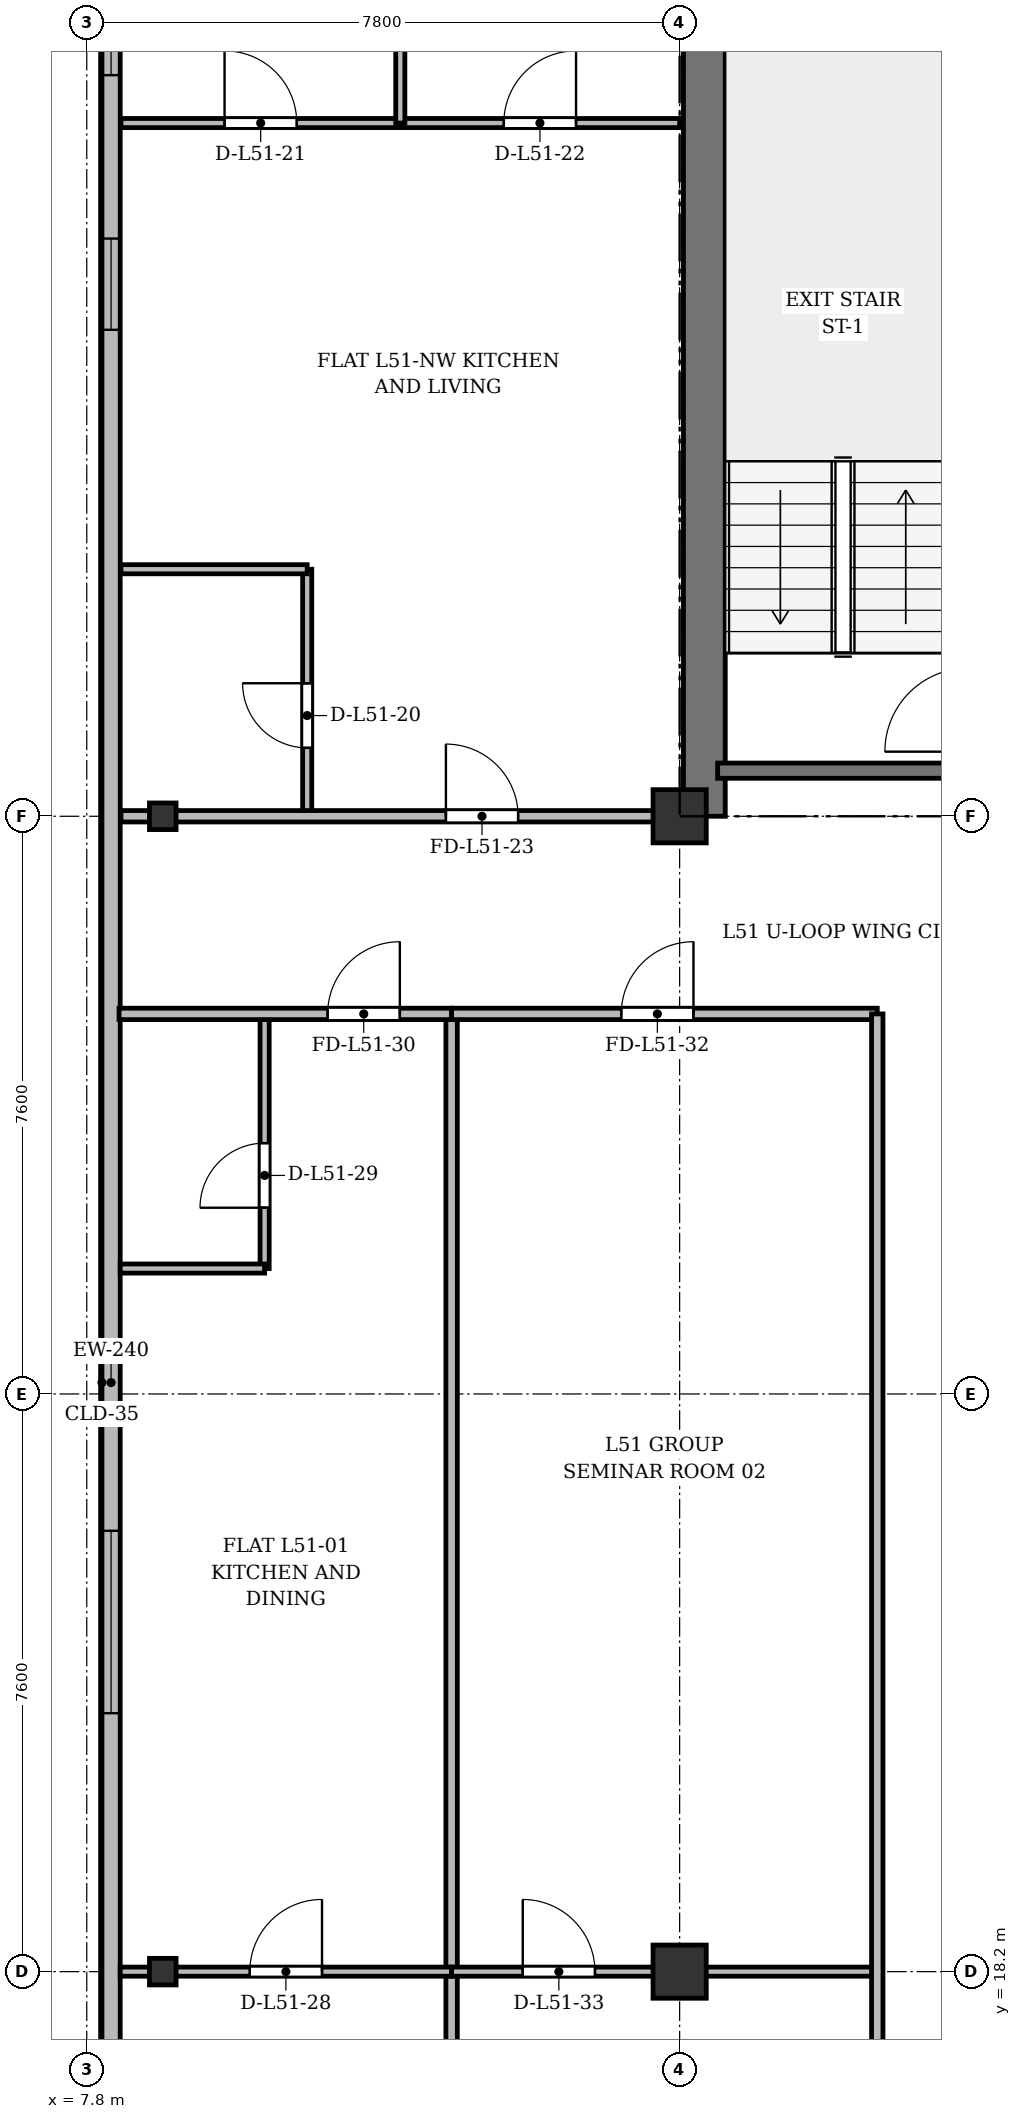
"""IFC4 building model, lengths in metres.
Left out: names, types, materials, properties, quantities, classifications, styles, units other than length and angle.
Written with IfcOpenShell. Run it as: python <this file> out.ifc"""

import sys

from ifc_helpers import new_model, si_unit, direction, frame, frame_2d, origin, origin_2d, place, context, subcontext, project, spatial, rectangle, i_section, extrude, source, transform, mapped, element, fill, save


model = new_model("IFC4")
c1 = context("Model", 3, precision=1e-05, world=origin(), true_north=direction((0.0, 1.0)))
c2 = subcontext(c1, "Body", "Model", "MODEL_VIEW")
j1 = project(units=[si_unit("LENGTHUNIT", "METRE"), si_unit("PLANEANGLEUNIT", "RADIAN")], contexts=[c1])
p1 = place(None, origin())
s1 = spatial("IfcSite", under=j1, at=p1, CompositionType="ELEMENT")
p2 = place(p1, origin())
s2 = spatial("IfcBuilding", under=s1, at=p2, CompositionType="ELEMENT")
p3 = place(p2, frame((0.0, 0.0, 197.7)))
s3 = spatial("IfcBuildingStorey", under=s2, at=p3, CompositionType="ELEMENT", Elevation=197.7)
m1 = source(origin(), c2, "Body", "SweptSolid", [
    extrude(i_section(OverallWidth=0.35, OverallDepth=0.35, WebThickness=0.018, FlangeThickness=0.028, at=origin_2d()), origin(), (0.0, 0.0, 1.0), 3.6),
])
for number, where, z_axis, x_axis in (
    (1, (8.8, 18.2, 0.0), (0.0, 0.0, 1.0), (1.0, 0.0, 0.0)),
    (2, (8.8, 33.4, 0.0), (0.0, 0.0, 1.0), (1.0, 0.0, 0.0)),
):
    element("IfcColumn", number, at=place(p3, frame(where, z_axis=z_axis, x_axis=x_axis)), inside=s3, PredefinedType="COLUMN", context=c2, shape_type="MappedRepresentation", body=[
        mapped(m1, transform((0.0, 0.0, 0.0), x_axis=(1.0, 0.0, 0.0), y_axis=(0.0, 1.0, 0.0), z_axis=(0.0, 0.0, 1.0), scale=1.0)),
    ])
m2 = source(origin(), c2, "Body", "SweptSolid", [
    extrude(rectangle(XDim=0.7, YDim=0.7, at=origin_2d()), origin(), (0.0, 0.0, 1.0), 3.6),
])
for number, where, z_axis, x_axis in (
    (3, (15.6, 18.2, 0.0), (0.0, 0.0, 1.0), (1.0, 0.0, 0.0)),
    (4, (15.6, 33.4, 0.0), (0.0, 0.0, 1.0), (1.0, 0.0, 0.0)),
):
    element("IfcColumn", number, at=place(p3, frame(where, z_axis=z_axis, x_axis=x_axis)), inside=s3, PredefinedType="COLUMN", context=c2, shape_type="MappedRepresentation", body=[
        mapped(m2, transform((0.0, 0.0, 0.0), x_axis=(1.0, 0.0, 0.0), y_axis=(0.0, 1.0, 0.0), z_axis=(0.0, 0.0, 1.0), scale=1.0)),
    ])
p4 = place(p3, frame((8.12, 6.4, 0.0), z_axis=(0.0, 0.0, 1.0), x_axis=(0.0, 1.0, 0.0)))
e5 = element("IfcWall", 5, at=p4, inside=s3, PredefinedType="SOLIDWALL", context=c2, shape_type="SweptSolid", body=[
    extrude(rectangle(XDim=39.1, YDim=0.24, at=frame_2d((19.55, 0.0))), origin(), (0.0, 0.0, 1.0), 3.36),
])
p5 = place(p4, frame((1.45, 0.0, 0.92)))
e6 = element("IfcOpeningElement", 6, at=p5, cuts=e5, PredefinedType="OPENING", context=c2, shape_type="SweptSolid", body=[
    extrude(rectangle(XDim=1.2, YDim=1.65, at=frame_2d((0.6, 0.825))), frame((0.0, 0.13, 0.0), z_axis=(0.0, -1.0, 0.0), x_axis=(1.0, 0.0, 0.0)), (0.0, 0.0, 1.0), 0.26),
])
p6 = place(p4, frame((3.8, 0.0, 0.92)))
e7 = element("IfcOpeningElement", 7, at=p6, cuts=e5, PredefinedType="OPENING", context=c2, shape_type="SweptSolid", body=[
    extrude(rectangle(XDim=2.4, YDim=2.1, at=frame_2d((1.2, 1.05))), frame((0.0, 0.13, 0.0), z_axis=(0.0, -1.0, 0.0), x_axis=(1.0, 0.0, 0.0)), (0.0, 0.0, 1.0), 0.26),
])
p7 = place(p4, frame((8.0, 0.0, 0.92)))
e8 = element("IfcOpeningElement", 8, at=p7, cuts=e5, PredefinedType="OPENING", context=c2, shape_type="SweptSolid", body=[
    extrude(rectangle(XDim=2.4, YDim=2.1, at=frame_2d((1.2, 1.05))), frame((0.0, 0.13, 0.0), z_axis=(0.0, -1.0, 0.0), x_axis=(1.0, 0.0, 0.0)), (0.0, 0.0, 1.0), 0.26),
])
p8 = place(p4, frame((15.2, 0.0, 0.92)))
e9 = element("IfcOpeningElement", 9, at=p8, cuts=e5, PredefinedType="OPENING", context=c2, shape_type="SweptSolid", body=[
    extrude(rectangle(XDim=2.4, YDim=2.1, at=frame_2d((1.2, 1.05))), frame((0.0, 0.13, 0.0), z_axis=(0.0, -1.0, 0.0), x_axis=(1.0, 0.0, 0.0)), (0.0, 0.0, 1.0), 0.26),
])
p9 = place(p4, frame((33.4, 0.0, 0.92)))
e10 = element("IfcOpeningElement", 10, at=p9, cuts=e5, PredefinedType="OPENING", context=c2, shape_type="SweptSolid", body=[
    extrude(rectangle(XDim=1.2, YDim=1.65, at=frame_2d((0.6, 0.825))), frame((0.0, 0.13, 0.0), z_axis=(0.0, -1.0, 0.0), x_axis=(1.0, 0.0, 0.0)), (0.0, 0.0, 1.0), 0.26),
])
p10 = place(p4, frame((36.75, 0.0, 0.92)))
e11 = element("IfcOpeningElement", 11, at=p10, cuts=e5, PredefinedType="OPENING", context=c2, shape_type="SweptSolid", body=[
    extrude(rectangle(XDim=1.2, YDim=1.65, at=frame_2d((0.6, 0.825))), frame((0.0, 0.13, 0.0), z_axis=(0.0, -1.0, 0.0), x_axis=(1.0, 0.0, 0.0)), (0.0, 0.0, 1.0), 0.26),
])
p11 = place(p3, frame((15.925, 33.4, 0.0), z_axis=(0.0, 0.0, 1.0), x_axis=(0.0, 1.0, 0.0)))
e12 = element("IfcWall", 12, at=p11, inside=s3, PredefinedType="SHEAR", context=c2, shape_type="SweptSolid", body=[
    extrude(rectangle(XDim=11.55, YDim=0.55, at=frame_2d((5.775, 0.0))), origin(), (0.0, 0.0, 1.0), 3.36),
])
p12 = place(p3, frame((16.1, 34.0, 0.0), z_axis=(0.0, 0.0, 1.0), x_axis=(1.0, 0.0, 0.0)))
e13 = element("IfcWall", 13, at=p12, inside=s3, PredefinedType="SHEAR", context=c2, shape_type="SweptSolid", body=[
    extrude(rectangle(XDim=3.4, YDim=0.2, at=frame_2d((1.7, 0.0))), origin(), (0.0, 0.0, 1.0), 3.36),
])
p13 = place(p3, frame((10.7, 33.4, 0.0), z_axis=(0.0, 0.0, 1.0), x_axis=(0.0, 1.0, 0.0)))
e14 = element("IfcWall", 14, at=p13, inside=s3, PredefinedType="PARTITIONING", context=c2, shape_type="SweptSolid", body=[
    extrude(rectangle(XDim=3.25, YDim=0.12, at=frame_2d((1.625, 0.0))), origin(), (0.0, 0.0, 1.0), 2.91),
])
p14 = place(p13, frame((0.9, 0.0, 0.0)))
e15 = element("IfcOpeningElement", 15, at=p14, cuts=e14, PredefinedType="OPENING", context=c2, shape_type="SweptSolid", body=[
    extrude(rectangle(XDim=0.85, YDim=2.1, at=frame_2d((0.425, 1.05))), frame((0.0, 0.07, 0.0), z_axis=(0.0, -1.0, 0.0), x_axis=(1.0, 0.0, 0.0)), (0.0, 0.0, 1.0), 0.14),
])
p15 = place(p3, frame((8.25, 36.65, 0.0), z_axis=(0.0, 0.0, 1.0), x_axis=(1.0, 0.0, 0.0)))
e16 = element("IfcWall", 16, at=p15, inside=s3, PredefinedType="PARTITIONING", context=c2, shape_type="SweptSolid", body=[
    extrude(rectangle(XDim=2.45, YDim=0.12, at=frame_2d((1.225, 0.0))), origin(), (0.0, 0.0, 1.0), 2.86),
])
p16 = place(p3, frame((8.25, 42.52, 0.0), z_axis=(0.0, 0.0, 1.0), x_axis=(1.0, 0.0, 0.0)))
e17 = element("IfcWall", 17, at=p16, inside=s3, PredefinedType="PARTITIONING", context=c2, shape_type="SweptSolid", body=[
    extrude(rectangle(XDim=3.675, YDim=0.12, at=frame_2d((1.837, 0.0))), origin(), (0.0, 0.0, 1.0), 2.86),
])
p17 = place(p16, frame((1.363, 0.0, 0.0)))
e18 = element("IfcOpeningElement", 18, at=p17, cuts=e17, PredefinedType="OPENING", context=c2, shape_type="SweptSolid", body=[
    extrude(rectangle(XDim=0.95, YDim=2.15, at=frame_2d((0.475, 1.075))), frame((0.0, 0.07, 0.0), z_axis=(0.0, -1.0, 0.0), x_axis=(1.0, 0.0, 0.0)), (0.0, 0.0, 1.0), 0.14),
])
p18 = place(p3, frame((11.925, 42.52, 0.0), z_axis=(0.0, 0.0, 1.0), x_axis=(1.0, 0.0, 0.0)))
e19 = element("IfcWall", 19, at=p18, inside=s3, PredefinedType="PARTITIONING", context=c2, shape_type="SweptSolid", body=[
    extrude(rectangle(XDim=3.675, YDim=0.12, at=frame_2d((1.837, 0.0))), origin(), (0.0, 0.0, 1.0), 2.86),
])
p19 = place(p18, frame((1.362, 0.0, 0.0)))
e20 = element("IfcOpeningElement", 20, at=p19, cuts=e19, PredefinedType="OPENING", context=c2, shape_type="SweptSolid", body=[
    extrude(rectangle(XDim=0.95, YDim=2.15, at=frame_2d((0.475, 1.075))), frame((0.0, 0.07, 0.0), z_axis=(0.0, -1.0, 0.0), x_axis=(1.0, 0.0, 0.0)), (0.0, 0.0, 1.0), 0.14),
])
p20 = place(p3, frame((11.925, 42.52, 0.0), z_axis=(0.0, 0.0, 1.0), x_axis=(0.0, 1.0, 0.0)))
e21 = element("IfcWall", 21, at=p20, inside=s3, PredefinedType="PARTITIONING", context=c2, shape_type="SweptSolid", body=[
    extrude(rectangle(XDim=5.74, YDim=0.12, at=frame_2d((2.87, 0.0))), origin(), (0.0, 0.0, 1.0), 2.91),
])
p21 = place(p3, frame((8.25, 33.4, 0.0), z_axis=(0.0, 0.0, 1.0), x_axis=(1.0, 0.0, 0.0)))
e22 = element("IfcWall", 22, at=p21, inside=s3, PredefinedType="PARTITIONING", context=c2, shape_type="SweptSolid", body=[
    extrude(rectangle(XDim=7.35, YDim=0.15, at=frame_2d((3.675, 0.0))), origin(), (0.0, 0.0, 1.0), 2.91),
])
p22 = place(p21, frame((4.275, 0.0, 0.0)))
e23 = element("IfcOpeningElement", 23, at=p22, cuts=e22, PredefinedType="OPENING", context=c2, shape_type="SweptSolid", body=[
    extrude(rectangle(XDim=0.95, YDim=2.15, at=frame_2d((0.475, 1.075))), frame((0.0, 0.085, 0.0), z_axis=(0.0, -1.0, 0.0), x_axis=(1.0, 0.0, 0.0)), (0.0, 0.0, 1.0), 0.17),
])
p23 = place(p3, frame((12.6, 3.625, 0.0), z_axis=(0.0, 0.0, 1.0), x_axis=(0.0, 1.0, 0.0)))
e24 = element("IfcWall", 24, at=p23, inside=s3, PredefinedType="PARTITIONING", context=c2, shape_type="SweptSolid", body=[
    extrude(rectangle(XDim=27.175, YDim=0.15, at=frame_2d((13.587, 0.0))), origin(), (0.0, 0.0, 1.0), 2.91),
])
p24 = place(p3, frame((8.24, 18.2, 0.0), z_axis=(0.0, 0.0, 1.0), x_axis=(1.0, 0.0, 0.0)))
e25 = element("IfcWall", 25, at=p24, inside=s3, PredefinedType="PARTITIONING", context=c2, shape_type="SweptSolid", body=[
    extrude(rectangle(XDim=4.36, YDim=0.12, at=frame_2d((2.18, 0.0))), origin(), (0.0, 0.0, 1.0), 2.91),
])
p25 = place(p24, frame((1.705, 0.0, 0.0)))
e26 = element("IfcOpeningElement", 26, at=p25, cuts=e25, PredefinedType="OPENING", context=c2, shape_type="SweptSolid", body=[
    extrude(rectangle(XDim=0.95, YDim=2.15, at=frame_2d((0.475, 1.075))), frame((0.0, 0.07, 0.0), z_axis=(0.0, -1.0, 0.0), x_axis=(1.0, 0.0, 0.0)), (0.0, 0.0, 1.0), 0.14),
])
p26 = place(p3, frame((10.14, 27.45, 0.0), z_axis=(0.0, 0.0, 1.0), x_axis=(0.0, 1.0, 0.0)))
e27 = element("IfcWall", 27, at=p26, inside=s3, PredefinedType="PARTITIONING", context=c2, shape_type="SweptSolid", body=[
    extrude(rectangle(XDim=3.35, YDim=0.12, at=frame_2d((1.675, 0.0))), origin(), (0.0, 0.0, 1.0), 3.36),
])
p27 = place(p26, frame((0.8, 0.0, 0.0)))
e28 = element("IfcOpeningElement", 28, at=p27, cuts=e27, PredefinedType="OPENING", context=c2, shape_type="SweptSolid", body=[
    extrude(rectangle(XDim=0.85, YDim=2.1, at=frame_2d((0.425, 1.05))), frame((0.0, 0.07, 0.0), z_axis=(0.0, -1.0, 0.0), x_axis=(1.0, 0.0, 0.0)), (0.0, 0.0, 1.0), 0.14),
])
p28 = place(p3, frame((8.24, 27.45, 0.0), z_axis=(0.0, 0.0, 1.0), x_axis=(1.0, 0.0, 0.0)))
e29 = element("IfcWall", 29, at=p28, inside=s3, PredefinedType="PARTITIONING", context=c2, shape_type="SweptSolid", body=[
    extrude(rectangle(XDim=1.9, YDim=0.12, at=frame_2d((0.95, 0.0))), origin(), (0.0, 0.0, 1.0), 2.86),
])
p29 = place(p3, frame((8.225, 30.8, 0.0), z_axis=(0.0, 0.0, 1.0), x_axis=(1.0, 0.0, 0.0)))
e30 = element("IfcWall", 30, at=p29, inside=s3, PredefinedType="PARTITIONING", context=c2, shape_type="SweptSolid", body=[
    extrude(rectangle(XDim=4.375, YDim=0.15, at=frame_2d((2.188, 0.0))), origin(), (0.0, 0.0, 1.0), 2.86),
])
p30 = place(p29, frame((2.744, 0.0, 0.0)))
e31 = element("IfcOpeningElement", 31, at=p30, cuts=e30, PredefinedType="OPENING", context=c2, shape_type="SweptSolid", body=[
    extrude(rectangle(XDim=0.95, YDim=2.15, at=frame_2d((0.475, 1.075))), frame((0.0, 0.085, 0.0), z_axis=(0.0, -1.0, 0.0), x_axis=(1.0, 0.0, 0.0)), (0.0, 0.0, 1.0), 0.17),
])
p31 = place(p3, frame((12.6, 30.8, 0.0), z_axis=(0.0, 0.0, 1.0), x_axis=(1.0, 0.0, 0.0)))
e32 = element("IfcWall", 32, at=p31, inside=s3, PredefinedType="PARTITIONING", context=c2, shape_type="SweptSolid", body=[
    extrude(rectangle(XDim=5.6, YDim=0.15, at=frame_2d((2.8, 0.0))), origin(), (0.0, 0.0, 1.0), 2.86),
])
p32 = place(p31, frame((2.232, 0.0, 0.0)))
e33 = element("IfcOpeningElement", 33, at=p32, cuts=e32, PredefinedType="OPENING", context=c2, shape_type="SweptSolid", body=[
    extrude(rectangle(XDim=0.95, YDim=2.15, at=frame_2d((0.475, 1.075))), frame((0.0, 0.085, 0.0), z_axis=(0.0, -1.0, 0.0), x_axis=(1.0, 0.0, 0.0)), (0.0, 0.0, 1.0), 0.17),
])
p33 = place(p3, frame((12.6, 18.2, 0.0), z_axis=(0.0, 0.0, 1.0), x_axis=(1.0, 0.0, 0.0)))
e34 = element("IfcWall", 34, at=p33, inside=s3, PredefinedType="PARTITIONING", context=c2, shape_type="SweptSolid", body=[
    extrude(rectangle(XDim=5.6, YDim=0.12, at=frame_2d((2.8, 0.0))), origin(), (0.0, 0.0, 1.0), 2.91),
])
p34 = place(p33, frame((0.936, 0.0, 0.0)))
e35 = element("IfcOpeningElement", 35, at=p34, cuts=e34, PredefinedType="OPENING", context=c2, shape_type="SweptSolid", body=[
    extrude(rectangle(XDim=0.95, YDim=2.15, at=frame_2d((0.475, 1.075))), frame((0.0, 0.07, 0.0), z_axis=(0.0, -1.0, 0.0), x_axis=(1.0, 0.0, 0.0)), (0.0, 0.0, 1.0), 0.14),
])
p35 = place(p3, frame((18.2, 3.625, 0.0), z_axis=(0.0, 0.0, 1.0), x_axis=(0.0, 1.0, 0.0)))
e36 = element("IfcWall", 36, at=p35, inside=s3, PredefinedType="PARTITIONING", context=c2, shape_type="SweptSolid", body=[
    extrude(rectangle(XDim=27.175, YDim=0.15, at=frame_2d((13.587, 0.0))), origin(), (0.0, 0.0, 1.0), 2.91),
])
m3 = source(origin(), c2, "Body", "SweptSolid", [
    extrude(rectangle(XDim=2.4, YDim=2.1, at=frame_2d((1.2, 1.05))), frame((0.0, 0.03, 0.0), z_axis=(0.0, -1.0, 0.0), x_axis=(1.0, 0.0, 0.0)), (0.0, 0.0, 1.0), 0.06),
])
p36 = place(p8, origin())
e37 = element("IfcWindow", 37, at=p36, inside=s3, PartitioningType="SINGLE_PANEL", PredefinedType="WINDOW", context=c2, shape_type="MappedRepresentation", body=[
    mapped(m3, transform((0.0, 0.0, 0.0), x_axis=(1.0, 0.0, 0.0), y_axis=(0.0, 1.0, 0.0), z_axis=(0.0, 0.0, 1.0), scale=1.0)),
])
fill(e9, e37)
m4 = source(origin(), c2, "Body", "SweptSolid", [
    extrude(rectangle(XDim=1.2, YDim=1.65, at=frame_2d((0.6, 0.825))), frame((0.0, 0.03, 0.0), z_axis=(0.0, -1.0, 0.0), x_axis=(1.0, 0.0, 0.0)), (0.0, 0.0, 1.0), 0.06),
])
p37 = place(p9, origin())
e38 = element("IfcWindow", 38, at=p37, inside=s3, PartitioningType="SINGLE_PANEL", PredefinedType="WINDOW", context=c2, shape_type="MappedRepresentation", body=[
    mapped(m4, transform((0.0, 0.0, 0.0), x_axis=(1.0, 0.0, 0.0), y_axis=(0.0, 1.0, 0.0), z_axis=(0.0, 0.0, 1.0), scale=1.0)),
])
fill(e10, e38)
p38 = place(p10, origin())
e39 = element("IfcWindow", 39, at=p38, inside=s3, PartitioningType="SINGLE_PANEL", PredefinedType="WINDOW", context=c2, shape_type="MappedRepresentation", body=[
    mapped(m4, transform((0.0, 0.0, 0.0), x_axis=(1.0, 0.0, 0.0), y_axis=(0.0, 1.0, 0.0), z_axis=(0.0, 0.0, 1.0), scale=1.0)),
])
fill(e11, e39)
m5 = source(origin(), c2, "Body", "SweptSolid", [
    extrude(rectangle(XDim=0.85, YDim=2.1, at=frame_2d((0.425, 1.05))), frame((0.0, 0.025, 0.0), z_axis=(0.0, -1.0, 0.0), x_axis=(1.0, 0.0, 0.0)), (0.0, 0.0, 1.0), 0.05),
])
p39 = place(p14, origin())
e40 = element("IfcDoor", 40, at=p39, inside=s3, OperationType="SINGLE_SWING_RIGHT", PredefinedType="DOOR", context=c2, shape_type="MappedRepresentation", body=[
    mapped(m5, transform((0.0, 0.0, 0.0), x_axis=(1.0, 0.0, 0.0), y_axis=(0.0, 1.0, 0.0), z_axis=(0.0, 0.0, 1.0), scale=1.0)),
])
fill(e15, e40)
m6 = source(origin(), c2, "Body", "SweptSolid", [
    extrude(rectangle(XDim=0.95, YDim=2.15, at=frame_2d((0.475, 1.075))), frame((0.0, 0.025, 0.0), z_axis=(0.0, -1.0, 0.0), x_axis=(1.0, 0.0, 0.0)), (0.0, 0.0, 1.0), 0.05),
])
p40 = place(p17, origin())
e41 = element("IfcDoor", 41, at=p40, inside=s3, OperationType="SINGLE_SWING_LEFT", PredefinedType="DOOR", context=c2, shape_type="MappedRepresentation", body=[
    mapped(m6, transform((0.0, 0.0, 0.0), x_axis=(1.0, 0.0, 0.0), y_axis=(0.0, 1.0, 0.0), z_axis=(0.0, 0.0, 1.0), scale=1.0)),
])
fill(e18, e41)
p41 = place(p19, origin())
e42 = element("IfcDoor", 42, at=p41, inside=s3, OperationType="SINGLE_SWING_RIGHT", PredefinedType="DOOR", context=c2, shape_type="MappedRepresentation", body=[
    mapped(m6, transform((0.0, 0.0, 0.0), x_axis=(1.0, 0.0, 0.0), y_axis=(0.0, 1.0, 0.0), z_axis=(0.0, 0.0, 1.0), scale=1.0)),
])
fill(e20, e42)
p42 = place(p22, origin())
e43 = element("IfcDoor", 43, at=p42, inside=s3, OperationType="SINGLE_SWING_LEFT", PredefinedType="DOOR", context=c2, shape_type="MappedRepresentation", body=[
    mapped(m6, transform((0.0, 0.0, 0.0), x_axis=(1.0, 0.0, 0.0), y_axis=(0.0, 1.0, 0.0), z_axis=(0.0, 0.0, 1.0), scale=1.0)),
])
fill(e23, e43)
p43 = place(p25, origin())
e44 = element("IfcDoor", 44, at=p43, inside=s3, OperationType="SINGLE_SWING_RIGHT", PredefinedType="DOOR", context=c2, shape_type="MappedRepresentation", body=[
    mapped(m6, transform((0.0, 0.0, 0.0), x_axis=(1.0, 0.0, 0.0), y_axis=(0.0, 1.0, 0.0), z_axis=(0.0, 0.0, 1.0), scale=1.0)),
])
fill(e26, e44)
p44 = place(p27, origin())
e45 = element("IfcDoor", 45, at=p44, inside=s3, OperationType="SINGLE_SWING_LEFT", PredefinedType="DOOR", context=c2, shape_type="MappedRepresentation", body=[
    mapped(m5, transform((0.0, 0.0, 0.0), x_axis=(1.0, 0.0, 0.0), y_axis=(0.0, 1.0, 0.0), z_axis=(0.0, 0.0, 1.0), scale=1.0)),
])
fill(e28, e45)
p45 = place(p30, origin())
e46 = element("IfcDoor", 46, at=p45, inside=s3, OperationType="SINGLE_SWING_RIGHT", PredefinedType="DOOR", context=c2, shape_type="MappedRepresentation", body=[
    mapped(m6, transform((0.0, 0.0, 0.0), x_axis=(1.0, 0.0, 0.0), y_axis=(0.0, 1.0, 0.0), z_axis=(0.0, 0.0, 1.0), scale=1.0)),
])
fill(e31, e46)
p46 = place(p32, origin())
e47 = element("IfcDoor", 47, at=p46, inside=s3, OperationType="SINGLE_SWING_RIGHT", PredefinedType="DOOR", context=c2, shape_type="MappedRepresentation", body=[
    mapped(m6, transform((0.0, 0.0, 0.0), x_axis=(1.0, 0.0, 0.0), y_axis=(0.0, 1.0, 0.0), z_axis=(0.0, 0.0, 1.0), scale=1.0)),
])
fill(e33, e47)
p47 = place(p34, origin())
e48 = element("IfcDoor", 48, at=p47, inside=s3, OperationType="SINGLE_SWING_LEFT", PredefinedType="DOOR", context=c2, shape_type="MappedRepresentation", body=[
    mapped(m6, transform((0.0, 0.0, 0.0), x_axis=(1.0, 0.0, 0.0), y_axis=(0.0, 1.0, 0.0), z_axis=(0.0, 0.0, 1.0), scale=1.0)),
])
fill(e35, e48)
save(model, sys.argv[1])
